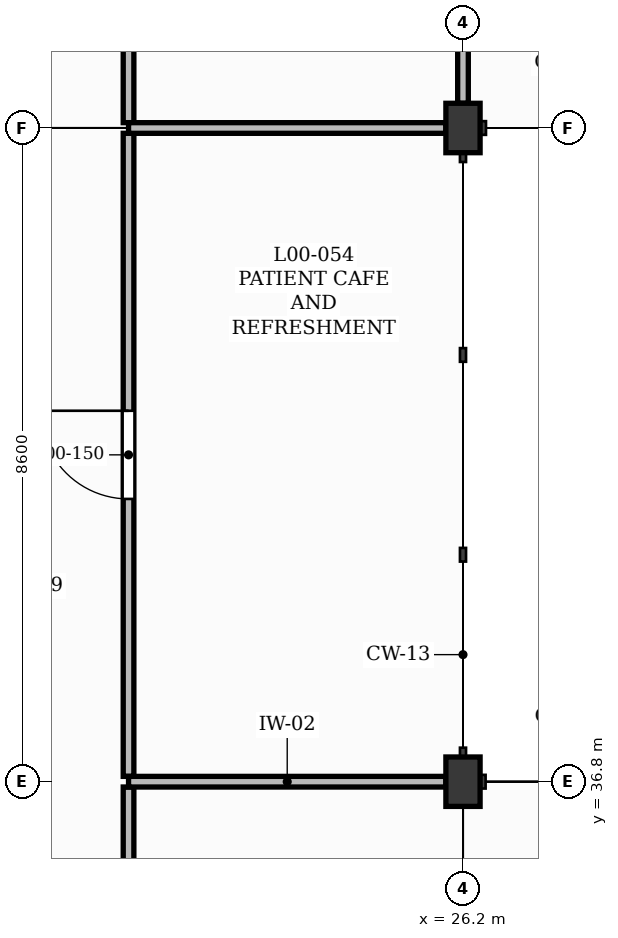
"""IFC4 building model, lengths in metres.
Left out: names, types, materials, properties, quantities, classifications, styles, units other than length and angle.
Written with IfcOpenShell. Run it as: python <this file> out.ifc"""

import sys

from ifc_helpers import new_model, si_unit, direction, frame, frame_2d, origin, origin_2d, place, context, subcontext, project, spatial, rectangle, extrude, element, fill, save


model = new_model("IFC4")
c1 = context("Model", 3, precision=1e-05, world=origin(), true_north=direction((0.0, 1.0)))
c2 = subcontext(c1, "Body", "Model", "MODEL_VIEW")
j1 = project(units=[si_unit("LENGTHUNIT", "METRE"), si_unit("PLANEANGLEUNIT", "RADIAN")], contexts=[c1])
p1 = place(None, origin())
s1 = spatial("IfcSite", under=j1, at=p1, CompositionType="ELEMENT")
p2 = place(p1, origin())
s2 = spatial("IfcBuilding", under=s1, at=p2, CompositionType="ELEMENT")
p3 = place(p2, origin())
s3 = spatial("IfcBuildingStorey", under=s2, at=p3, CompositionType="ELEMENT", Elevation=0.0)
for number, where, z_axis, x_axis in (
    (1, (26.2, 36.8, 0.0), (0.0, 0.0, 1.0), (1.0, 0.0, 0.0)),
    (2, (26.2, 45.4, 0.0), (0.0, 0.0, 1.0), (1.0, 0.0, 0.0)),
):
    element("IfcColumn", number, at=place(p3, frame(where, z_axis=z_axis, x_axis=x_axis)), inside=s3, PredefinedType="COLUMN", context=c2, shape_type="SweptSolid", body=[
        extrude(rectangle(XDim=0.45, YDim=0.65, at=origin_2d()), origin(), (0.0, 0.0, 1.0), 4.2),
    ])
p4 = place(p3, frame((21.8, 27.27, 0.0), z_axis=(0.0, 0.0, 1.0), x_axis=(0.0, 1.0, 0.0)))
e3 = element("IfcWall", 3, at=p4, inside=s3, PredefinedType="PARTITIONING", context=c2, shape_type="SweptSolid", body=[
    extrude(rectangle(XDim=9.46, YDim=0.14, at=frame_2d((4.73, 0.0))), origin(), (0.0, 0.0, 1.0), 4.18),
])
p5 = place(p4, frame((3.9, 0.0, 0.0)))
e4 = element("IfcOpeningElement", 4, at=p5, cuts=e3, PredefinedType="OPENING", context=c2, shape_type="SweptSolid", body=[
    extrude(rectangle(XDim=1.66, YDim=2.3, at=frame_2d((0.83, 1.15))), frame((0.0, 0.08, 0.0), z_axis=(0.0, -1.0, 0.0), x_axis=(1.0, 0.0, 0.0)), (0.0, 0.0, 1.0), 0.16),
])
p6 = place(p3, frame((21.8, 36.87, 0.0), z_axis=(0.0, 0.0, 1.0), x_axis=(0.0, 1.0, 0.0)))
e5 = element("IfcWall", 5, at=p6, inside=s3, PredefinedType="PARTITIONING", context=c2, shape_type="SweptSolid", body=[
    extrude(rectangle(XDim=8.46, YDim=0.14, at=frame_2d((4.23, 0.0))), origin(), (0.0, 0.0, 1.0), 4.18),
])
p7 = place(p6, frame((3.65, 0.0, 0.0)))
e6 = element("IfcOpeningElement", 6, at=p7, cuts=e5, PredefinedType="OPENING", context=c2, shape_type="SweptSolid", body=[
    extrude(rectangle(XDim=1.16, YDim=2.1, at=frame_2d((0.58, 1.05))), frame((0.0, 0.08, 0.0), z_axis=(0.0, -1.0, 0.0), x_axis=(1.0, 0.0, 0.0)), (0.0, 0.0, 1.0), 0.16),
])
p8 = place(p3, frame((21.8, 36.8, 0.0), z_axis=(0.0, 0.0, 1.0), x_axis=(1.0, 0.0, 0.0)))
e7 = element("IfcWall", 7, at=p8, inside=s3, PredefinedType="PARTITIONING", context=c2, shape_type="SweptSolid", body=[
    extrude(rectangle(XDim=4.175, YDim=0.14, at=frame_2d((2.087, 0.0))), origin(), (0.0, 0.0, 1.0), 3.5),
])
p9 = place(p3, frame((21.8, 45.47, 0.0), z_axis=(0.0, 0.0, 1.0), x_axis=(0.0, 1.0, 0.0)))
e8 = element("IfcWall", 8, at=p9, inside=s3, PredefinedType="PARTITIONING", context=c2, shape_type="SweptSolid", body=[
    extrude(rectangle(XDim=5.06, YDim=0.14, at=frame_2d((2.53, 0.0))), origin(), (0.0, 0.0, 1.0), 4.18),
])
p10 = place(p9, frame((2.0, 0.0, 0.0)))
e9 = element("IfcOpeningElement", 9, at=p10, cuts=e8, PredefinedType="OPENING", context=c2, shape_type="SweptSolid", body=[
    extrude(rectangle(XDim=1.06, YDim=2.15, at=frame_2d((0.53, 1.075))), frame((0.0, 0.08, 0.0), z_axis=(0.0, -1.0, 0.0), x_axis=(1.0, 0.0, 0.0)), (0.0, 0.0, 1.0), 0.16),
])
p11 = place(p3, frame((21.8, 45.4, 0.0), z_axis=(0.0, 0.0, 1.0), x_axis=(1.0, 0.0, 0.0)))
e10 = element("IfcWall", 10, at=p11, inside=s3, PredefinedType="PARTITIONING", context=c2, shape_type="SweptSolid", body=[
    extrude(rectangle(XDim=4.175, YDim=0.14, at=frame_2d((2.087, 0.0))), origin(), (0.0, 0.0, 1.0), 3.25),
])
p12 = place(p3, frame((26.2, 45.725, 0.0), z_axis=(0.0, 0.0, 1.0), x_axis=(0.0, 1.0, 0.0)))
e11 = element("IfcWall", 11, at=p12, inside=s3, PredefinedType="PARTITIONING", context=c2, shape_type="SweptSolid", body=[
    extrude(rectangle(XDim=4.805, YDim=0.14, at=frame_2d((2.402, 0.0))), origin(), (0.0, 0.0, 1.0), 3.5),
])
p13 = place(p7, origin())
e12 = element("IfcDoor", 12, at=p13, inside=s3, OperationType="SINGLE_SWING_RIGHT", PredefinedType="DOOR", context=c2, shape_type="SweptSolid", body=[
    extrude(rectangle(XDim=1.16, YDim=2.1, at=frame_2d((0.58, 1.05))), frame((0.0, 0.025, 0.0), z_axis=(0.0, -1.0, 0.0), x_axis=(1.0, 0.0, 0.0)), (0.0, 0.0, 1.0), 0.05),
])
fill(e6, e12)
save(model, sys.argv[1])
